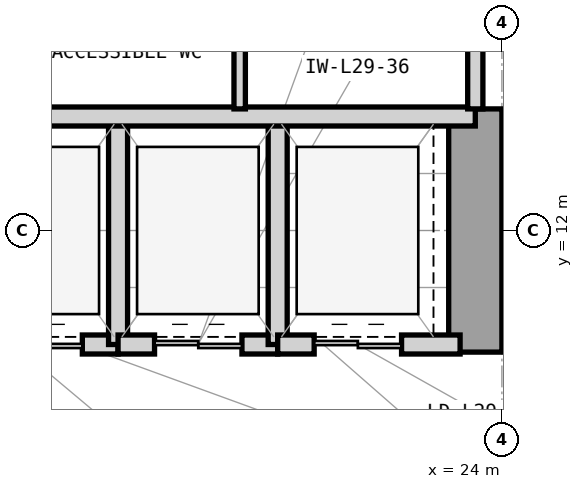
"""IFC4 building model, lengths in metres.
Left out: names, types, materials, properties, quantities, classifications, styles, units other than length and angle.
Written with IfcOpenShell. Run it as: python <this file> out.ifc"""

import sys

from ifc_helpers import new_model, si_unit, direction, frame, frame_2d, origin, place, context, subcontext, project, spatial, rectangle, extrude, element, fill, save


model = new_model("IFC4")
c1 = context("Model", 3, precision=1e-05, world=origin(), true_north=direction((0.0, 1.0)))
c2 = subcontext(c1, "Body", "Model", "MODEL_VIEW")
j1 = project(units=[si_unit("LENGTHUNIT", "METRE"), si_unit("PLANEANGLEUNIT", "RADIAN")], contexts=[c1])
p1 = place(None, origin())
s1 = spatial("IfcSite", under=j1, at=p1, CompositionType="ELEMENT")
p2 = place(p1, origin())
s2 = spatial("IfcBuilding", under=s1, at=p2, CompositionType="ELEMENT")
p3 = place(p2, frame((0.0, 0.0, 124.5)))
s3 = spatial("IfcBuildingStorey", under=s2, at=p3, CompositionType="ELEMENT", Elevation=124.5)
p4 = place(p3, frame((23.65, 10.4, 0.0), z_axis=(0.0, 0.0, 1.0), x_axis=(0.0, 1.0, 0.0)))
e1 = element("IfcWall", 1, at=p4, inside=s3, PredefinedType="SHEAR", context=c2, shape_type="SweptSolid", body=[
    extrude(rectangle(XDim=3.2, YDim=0.7, at=frame_2d((1.6, 0.0))), origin(), (0.0, 0.0, 1.0), 3.9),
])
p5 = place(p3, frame((16.85, 10.5, 0.0), z_axis=(0.0, 0.0, 1.0), x_axis=(1.0, 0.0, 0.0)))
e2 = element("IfcWall", 2, at=p5, inside=s3, PredefinedType="PARTITIONING", context=c2, shape_type="SweptSolid", body=[
    extrude(rectangle(XDim=2.1, YDim=0.25, at=frame_2d((1.05, 0.0))), origin(), (0.0, 0.0, 1.0), 3.233),
])
p6 = place(p5, frame((0.48, 0.0, 0.0)))
e3 = element("IfcOpeningElement", 3, at=p6, cuts=e2, PredefinedType="OPENING", context=c2, shape_type="SweptSolid", body=[
    extrude(rectangle(XDim=1.15, YDim=2.25, at=frame_2d((0.575, 1.125))), frame((0.0, 0.135, 0.0), z_axis=(0.0, -1.0, 0.0), x_axis=(1.0, 0.0, 0.0)), (0.0, 0.0, 1.0), 0.27),
])
p7 = place(p3, frame((18.95, 10.5, 0.0), z_axis=(0.0, 0.0, 1.0), x_axis=(0.0, 1.0, 0.0)))
e4 = element("IfcWall", 4, at=p7, inside=s3, PredefinedType="PARTITIONING", context=c2, shape_type="SweptSolid", body=[
    extrude(rectangle(XDim=3.0, YDim=0.25, at=frame_2d((1.5, 0.0))), origin(), (0.0, 0.0, 1.0), 3.69),
])
p8 = place(p3, frame((18.95, 10.5, 0.0), z_axis=(0.0, 0.0, 1.0), x_axis=(1.0, 0.0, 0.0)))
e5 = element("IfcWall", 5, at=p8, inside=s3, PredefinedType="PARTITIONING", context=c2, shape_type="SweptSolid", body=[
    extrude(rectangle(XDim=2.1, YDim=0.25, at=frame_2d((1.05, 0.0))), origin(), (0.0, 0.0, 1.0), 3.233),
])
p9 = place(p8, frame((0.48, 0.0, 0.0)))
e6 = element("IfcOpeningElement", 6, at=p9, cuts=e5, PredefinedType="OPENING", context=c2, shape_type="SweptSolid", body=[
    extrude(rectangle(XDim=1.15, YDim=2.25, at=frame_2d((0.575, 1.125))), frame((0.0, 0.135, 0.0), z_axis=(0.0, -1.0, 0.0), x_axis=(1.0, 0.0, 0.0)), (0.0, 0.0, 1.0), 0.27),
])
p10 = place(p3, frame((21.05, 10.5, 0.0), z_axis=(0.0, 0.0, 1.0), x_axis=(0.0, 1.0, 0.0)))
e7 = element("IfcWall", 7, at=p10, inside=s3, PredefinedType="PARTITIONING", context=c2, shape_type="SweptSolid", body=[
    extrude(rectangle(XDim=3.0, YDim=0.25, at=frame_2d((1.5, 0.0))), origin(), (0.0, 0.0, 1.0), 3.69),
])
p11 = place(p3, frame((21.05, 10.5, 0.0), z_axis=(0.0, 0.0, 1.0), x_axis=(1.0, 0.0, 0.0)))
e8 = element("IfcWall", 8, at=p11, inside=s3, PredefinedType="PARTITIONING", context=c2, shape_type="SweptSolid", body=[
    extrude(rectangle(XDim=2.4, YDim=0.25, at=frame_2d((1.2, 0.0))), origin(), (0.0, 0.0, 1.0), 3.233),
])
p12 = place(p11, frame((0.48, 0.0, 0.0)))
e9 = element("IfcOpeningElement", 9, at=p12, cuts=e8, PredefinedType="OPENING", context=c2, shape_type="SweptSolid", body=[
    extrude(rectangle(XDim=1.15, YDim=2.25, at=frame_2d((0.575, 1.125))), frame((0.0, 0.135, 0.0), z_axis=(0.0, -1.0, 0.0), x_axis=(1.0, 0.0, 0.0)), (0.0, 0.0, 1.0), 0.27),
])
p13 = place(p3, frame((14.7, 13.5, 0.0), z_axis=(0.0, 0.0, 1.0), x_axis=(1.0, 0.0, 0.0)))
e10 = element("IfcWall", 10, at=p13, inside=s3, PredefinedType="PARTITIONING", context=c2, shape_type="SweptSolid", body=[
    extrude(rectangle(XDim=8.95, YDim=0.25, at=frame_2d((4.475, 0.0))), origin(), (0.0, 0.0, 1.0), 3.233),
])
p14 = place(p3, frame((20.55, 13.6, 0.0), z_axis=(0.0, 0.0, 1.0), x_axis=(0.0, 1.0, 0.0)))
e11 = element("IfcWall", 11, at=p14, inside=s3, PredefinedType="PARTITIONING", context=c2, shape_type="SweptSolid", body=[
    extrude(rectangle(XDim=3.0, YDim=0.15, at=frame_2d((1.5, 0.0))), origin(), (0.0, 0.0, 1.0), 3.69),
])
p15 = place(p3, frame((23.65, 13.6, 0.0), z_axis=(0.0, 0.0, 1.0), x_axis=(0.0, 1.0, 0.0)))
e12 = element("IfcWall", 12, at=p15, inside=s3, PredefinedType="PARTITIONING", context=c2, shape_type="SweptSolid", body=[
    extrude(rectangle(XDim=3.0, YDim=0.2, at=frame_2d((1.5, 0.0))), origin(), (0.0, 0.0, 1.0), 3.69),
])
p16 = place(p15, frame((1.02, 0.0, 0.0)))
e13 = element("IfcOpeningElement", 13, at=p16, cuts=e12, PredefinedType="OPENING", context=c2, shape_type="SweptSolid", body=[
    extrude(rectangle(XDim=0.95, YDim=2.1, at=frame_2d((0.475, 1.05))), frame((0.0, 0.11, 0.0), z_axis=(0.0, -1.0, 0.0), x_axis=(1.0, 0.0, 0.0)), (0.0, 0.0, 1.0), 0.22),
])
p17 = place(p6, origin())
e14 = element("IfcDoor", 14, at=p17, inside=s3, OperationType="DOUBLE_DOOR_SLIDING", PredefinedType="DOOR", context=c2, shape_type="SweptSolid", body=[
    extrude(rectangle(XDim=1.15, YDim=2.25, at=frame_2d((0.575, 1.125))), frame((0.0, 0.025, 0.0), z_axis=(0.0, -1.0, 0.0), x_axis=(1.0, 0.0, 0.0)), (0.0, 0.0, 1.0), 0.05),
])
fill(e3, e14)
p18 = place(p9, origin())
e15 = element("IfcDoor", 15, at=p18, inside=s3, OperationType="DOUBLE_DOOR_SLIDING", PredefinedType="DOOR", context=c2, shape_type="SweptSolid", body=[
    extrude(rectangle(XDim=1.15, YDim=2.25, at=frame_2d((0.575, 1.125))), frame((0.0, 0.025, 0.0), z_axis=(0.0, -1.0, 0.0), x_axis=(1.0, 0.0, 0.0)), (0.0, 0.0, 1.0), 0.05),
])
fill(e6, e15)
p19 = place(p12, origin())
e16 = element("IfcDoor", 16, at=p19, inside=s3, OperationType="DOUBLE_DOOR_SLIDING", PredefinedType="DOOR", context=c2, shape_type="SweptSolid", body=[
    extrude(rectangle(XDim=1.15, YDim=2.25, at=frame_2d((0.575, 1.125))), frame((0.0, 0.025, 0.0), z_axis=(0.0, -1.0, 0.0), x_axis=(1.0, 0.0, 0.0)), (0.0, 0.0, 1.0), 0.05),
])
fill(e9, e16)
save(model, sys.argv[1])
